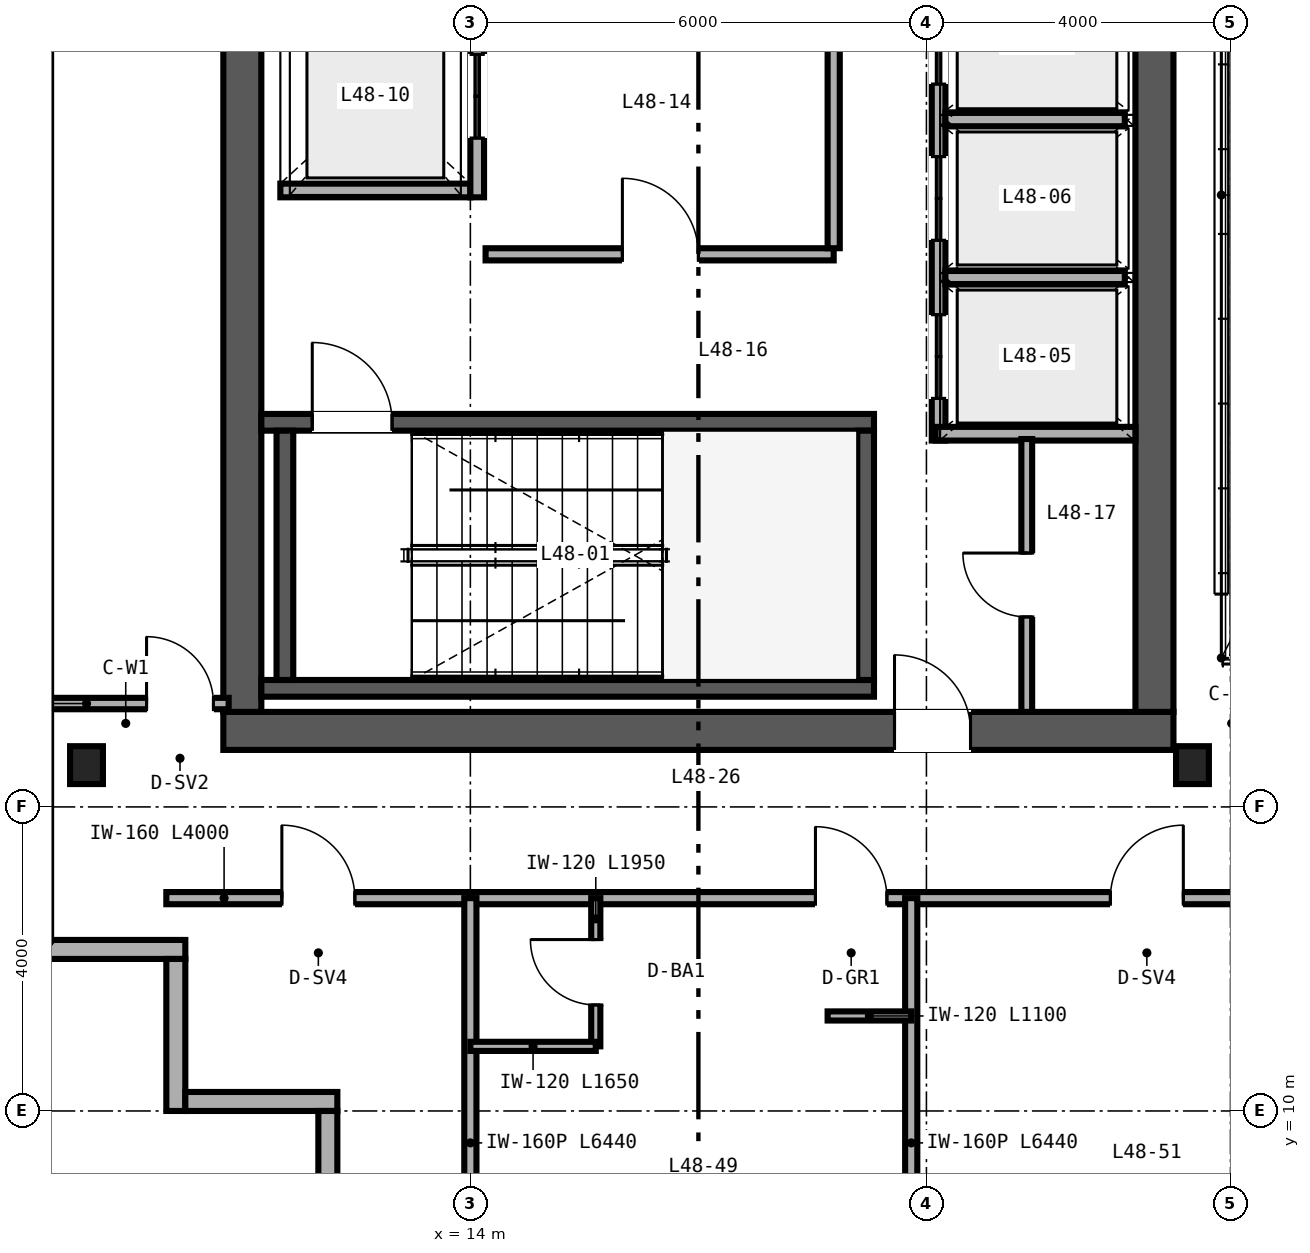
"""IFC4 building model, lengths in metres.
Left out: names, types, materials, properties, quantities, classifications, styles, units other than length and angle.
Written with IfcOpenShell. Run it as: python <this file> out.ifc"""

import sys

from ifc_helpers import new_model, si_unit, direction, frame, frame_2d, origin, origin_2d, place, context, subcontext, project, spatial, rectangle, i_section, extrude, source, transform, mapped, element, fill, save


model = new_model("IFC4")
c1 = context("Model", 3, precision=1e-05, world=origin(), true_north=direction((0.0, 1.0)))
c2 = subcontext(c1, "Body", "Model", "MODEL_VIEW")
j1 = project(units=[si_unit("LENGTHUNIT", "METRE"), si_unit("PLANEANGLEUNIT", "RADIAN")], contexts=[c1])
p1 = place(None, origin())
s1 = spatial("IfcSite", under=j1, at=p1, CompositionType="ELEMENT")
p2 = place(p1, origin())
s2 = spatial("IfcBuilding", under=s1, at=p2, CompositionType="ELEMENT")
p3 = place(p2, frame((0.0, 0.0, 192.0)))
s3 = spatial("IfcBuildingStorey", under=s2, at=p3, CompositionType="ELEMENT", Elevation=192.0)
p4 = place(p3, frame((10.75, 15.0, 0.0), z_axis=(0.0, 0.0, 1.0), x_axis=(1.0, 0.0, 0.0)))
e1 = element("IfcWall", 1, at=p4, inside=s3, PredefinedType="SHEAR", context=c2, shape_type="SweptSolid", body=[
    extrude(rectangle(XDim=12.5, YDim=0.5, at=frame_2d((6.25, 0.0))), origin(), (0.0, 0.0, 1.0), 3.37),
])
p5 = place(p4, frame((8.83, 0.0, 0.0)))
e2 = element("IfcOpeningElement", 2, at=p5, cuts=e1, PredefinedType="OPENING", context=c2, shape_type="SweptSolid", body=[
    extrude(rectangle(XDim=1.0, YDim=2.15, at=frame_2d((0.5, 1.075))), frame((0.0, 0.26, 0.0), z_axis=(0.0, -1.0, 0.0), x_axis=(1.0, 0.0, 0.0)), (0.0, 0.0, 1.0), 0.52),
])
for number, where, z_axis, x_axis in (
    (3, (11.0, 15.25, 0.0), (0.0, 0.0, 1.0), (0.0, 1.0, 0.0)),
    (4, (23.0, 15.25, 0.0), (0.0, 0.0, 1.0), (0.0, 1.0, 0.0)),
):
    element("IfcWall", number, at=place(p3, frame(where, z_axis=z_axis, x_axis=x_axis)), inside=s3, PredefinedType="SHEAR", context=c2, shape_type="SweptSolid", body=[
        extrude(rectangle(XDim=21.5, YDim=0.5, at=frame_2d((10.75, 0.0))), origin(), (0.0, 0.0, 1.0), 3.37),
    ])
p6 = place(p3, frame((11.25, 15.56, 0.0), z_axis=(0.0, 0.0, 1.0), x_axis=(1.0, 0.0, 0.0)))
e5 = element("IfcWall", 5, at=p6, inside=s3, PredefinedType="SHEAR", context=c2, shape_type="SweptSolid", body=[
    extrude(rectangle(XDim=8.06, YDim=0.22, at=frame_2d((4.03, 0.0))), origin(), (0.0, 0.0, 1.0), 3.4),
])
p7 = place(p3, frame((11.25, 19.06, 0.0), z_axis=(0.0, 0.0, 1.0), x_axis=(1.0, 0.0, 0.0)))
e6 = element("IfcWall", 6, at=p7, inside=s3, PredefinedType="SHEAR", context=c2, shape_type="SweptSolid", body=[
    extrude(rectangle(XDim=8.06, YDim=0.22, at=frame_2d((4.03, 0.0))), origin(), (0.0, 0.0, 1.0), 3.4),
])
p8 = place(p7, frame((0.67, 0.0, 0.0)))
e7 = element("IfcOpeningElement", 7, at=p8, cuts=e6, PredefinedType="OPENING", context=c2, shape_type="SweptSolid", body=[
    extrude(rectangle(XDim=1.05, YDim=2.15, at=frame_2d((0.525, 1.075))), frame((0.0, 0.12, 0.0), z_axis=(0.0, -1.0, 0.0), x_axis=(1.0, 0.0, 0.0)), (0.0, 0.0, 1.0), 0.24),
])
for number, where, z_axis, x_axis in (
    (8, (11.56, 15.67, 0.0), (0.0, 0.0, 1.0), (0.0, 1.0, 0.0)),
    (9, (19.2, 15.67, 0.0), (0.0, 0.0, 1.0), (0.0, 1.0, 0.0)),
):
    element("IfcWall", number, at=place(p3, frame(where, z_axis=z_axis, x_axis=x_axis)), inside=s3, PredefinedType="SHEAR", context=c2, shape_type="SweptSolid", body=[
        extrude(rectangle(XDim=3.28, YDim=0.22, at=frame_2d((1.64, 0.0))), origin(), (0.0, 0.0, 1.0), 3.4),
    ])
m1 = source(origin(), c2, "Body", "SweptSolid", [
    extrude(i_section(OverallWidth=0.432, OverallDepth=0.498, WebThickness=0.056, FlangeThickness=0.089, FilletRadius=0.025, at=origin_2d()), origin(), (0.0, 0.0, 1.0), 3.37),
])
for number, where, z_axis, x_axis in (
    (10, (8.95, 14.55, 0.0), (0.0, 0.0, 1.0), (1.0, 0.0, 0.0)),
    (11, (23.5, 14.55, 0.0), (0.0, 0.0, 1.0), (1.0, 0.0, 0.0)),
):
    element("IfcColumn", number, at=place(p3, frame(where, z_axis=z_axis, x_axis=x_axis)), inside=s3, PredefinedType="COLUMN", context=c2, shape_type="MappedRepresentation", body=[
        mapped(m1, transform((0.0, 0.0, 0.0), scale=1.0)),
    ])
p9 = place(p3, frame((8.0, 12.125, 0.0), z_axis=(0.0, 0.0, 1.0), x_axis=(1.0, 0.0, 0.0)))
e12 = element("IfcWall", 12, at=p9, inside=s3, PredefinedType="SOLIDWALL", context=c2, shape_type="SweptSolid", body=[
    extrude(rectangle(XDim=2.25, YDim=0.25, at=frame_2d((1.125, 0.0))), origin(), (0.0, 0.0, 1.0), 3.37),
])
for number, where, z_axis, x_axis in (
    (13, (10.125, 12.0, 0.0), (0.0, 0.0, 1.0), (0.0, -1.0, 0.0)),
    (14, (10.25, 10.125, 0.0), (0.0, 0.0, 1.0), (1.0, 0.0, 0.0)),
    (15, (12.125, 10.0, 0.0), (0.0, 0.0, 1.0), (0.0, -1.0, 0.0)),
):
    element("IfcWall", number, at=place(p3, frame(where, z_axis=z_axis, x_axis=x_axis)), inside=s3, PredefinedType="SOLIDWALL", context=c2, shape_type="SweptSolid", body=[
        extrude(rectangle(XDim=2.0, YDim=0.25, at=frame_2d((1.0, 0.0))), origin(), (0.0, 0.0, 1.0), 3.37),
    ])
p10 = place(p3, frame((20.16, 18.82, 0.0), z_axis=(0.0, 0.0, 1.0), x_axis=(0.0, 1.0, 0.0)))
e16 = element("IfcWall", 16, at=p10, inside=s3, PredefinedType="SOLIDWALL", context=c2, shape_type="SweptSolid", body=[
    extrude(rectangle(XDim=6.32, YDim=0.18, at=frame_2d((3.16, 0.0))), origin(), (0.0, 0.0, 1.0), 2.47),
])
p11 = place(p10, frame((0.555, 0.0, 0.0)))
e17 = element("IfcOpeningElement", 17, at=p11, cuts=e16, PredefinedType="OPENING", context=c2, shape_type="SweptSolid", body=[
    extrude(rectangle(XDim=1.1, YDim=2.2, at=frame_2d((0.55, 1.1))), frame((0.0, 0.1, 0.0), z_axis=(0.0, -1.0, 0.0), x_axis=(1.0, 0.0, 0.0)), (0.0, 0.0, 1.0), 0.2),
])
p12 = place(p10, frame((2.635, 0.0, 0.0)))
e18 = element("IfcOpeningElement", 18, at=p12, cuts=e16, PredefinedType="OPENING", context=c2, shape_type="SweptSolid", body=[
    extrude(rectangle(XDim=1.1, YDim=2.2, at=frame_2d((0.55, 1.1))), frame((0.0, 0.1, 0.0), z_axis=(0.0, -1.0, 0.0), x_axis=(1.0, 0.0, 0.0)), (0.0, 0.0, 1.0), 0.2),
])
p13 = place(p10, frame((4.69, 0.0, 0.0)))
e19 = element("IfcOpeningElement", 19, at=p13, cuts=e16, PredefinedType="OPENING", context=c2, shape_type="SweptSolid", body=[
    extrude(rectangle(XDim=1.1, YDim=2.2, at=frame_2d((0.55, 1.1))), frame((0.0, 0.1, 0.0), z_axis=(0.0, -1.0, 0.0), x_axis=(1.0, 0.0, 0.0)), (0.0, 0.0, 1.0), 0.2),
])
p14 = place(p3, frame((20.12, 18.91, 0.0), z_axis=(0.0, 0.0, 1.0), x_axis=(1.0, 0.0, 0.0)))
e20 = element("IfcWall", 20, at=p14, inside=s3, PredefinedType="SOLIDWALL", context=c2, shape_type="SweptSolid", body=[
    extrude(rectangle(XDim=2.63, YDim=0.18, at=frame_2d((1.315, 0.0))), origin(), (0.0, 0.0, 1.0), 3.37),
])
p15 = place(p3, frame((20.25, 20.965, 0.0), z_axis=(0.0, 0.0, 1.0), x_axis=(1.0, 0.0, 0.0)))
e21 = element("IfcWall", 21, at=p15, inside=s3, PredefinedType="SOLIDWALL", context=c2, shape_type="SweptSolid", body=[
    extrude(rectangle(XDim=2.36, YDim=0.18, at=frame_2d((1.18, 0.0))), origin(), (0.0, 0.0, 1.0), 2.47),
])
p16 = place(p3, frame((20.25, 23.045, 0.0), z_axis=(0.0, 0.0, 1.0), x_axis=(1.0, 0.0, 0.0)))
e22 = element("IfcWall", 22, at=p16, inside=s3, PredefinedType="SOLIDWALL", context=c2, shape_type="SweptSolid", body=[
    extrude(rectangle(XDim=2.36, YDim=0.18, at=frame_2d((1.18, 0.0))), origin(), (0.0, 0.0, 1.0), 3.37),
])
p17 = place(p3, frame((11.5, 22.11, 0.0), z_axis=(0.0, 0.0, 1.0), x_axis=(1.0, 0.0, 0.0)))
e23 = element("IfcWall", 23, at=p17, inside=s3, PredefinedType="SOLIDWALL", context=c2, shape_type="SweptSolid", body=[
    extrude(rectangle(XDim=2.5, YDim=0.18, at=frame_2d((1.25, 0.0))), origin(), (0.0, 0.0, 1.0), 3.37),
])
p18 = place(p3, frame((14.09, 22.02, 0.0), z_axis=(0.0, 0.0, 1.0), x_axis=(0.0, 1.0, 0.0)))
e24 = element("IfcWall", 24, at=p18, inside=s3, PredefinedType="SOLIDWALL", context=c2, shape_type="SweptSolid", body=[
    extrude(rectangle(XDim=2.66, YDim=0.18, at=frame_2d((1.33, 0.0))), origin(), (0.0, 0.0, 1.0), 3.37),
])
p19 = place(p18, frame((0.78, 0.0, 0.0)))
e25 = element("IfcOpeningElement", 25, at=p19, cuts=e24, PredefinedType="OPENING", context=c2, shape_type="SweptSolid", body=[
    extrude(rectangle(XDim=1.1, YDim=2.2, at=frame_2d((0.55, 1.1))), frame((0.0, 0.1, 0.0), z_axis=(0.0, -1.0, 0.0), x_axis=(1.0, 0.0, 0.0)), (0.0, 0.0, 1.0), 0.2),
])
p20 = place(p3, frame((14.2, 21.27, 0.0), z_axis=(0.0, 0.0, 1.0), x_axis=(1.0, 0.0, 0.0)))
e26 = element("IfcWall", 26, at=p20, inside=s3, PredefinedType="PARTITIONING", context=c2, shape_type="SweptSolid", body=[
    extrude(rectangle(XDim=4.58, YDim=0.16, at=frame_2d((2.29, 0.0))), origin(), (0.0, 0.0, 1.0), 3.37),
])
p21 = place(p20, frame((1.8, 0.0, 0.0)))
e27 = element("IfcOpeningElement", 27, at=p21, cuts=e26, PredefinedType="OPENING", context=c2, shape_type="SweptSolid", body=[
    extrude(rectangle(XDim=1.0, YDim=2.15, at=frame_2d((0.5, 1.075))), frame((0.0, 0.09, 0.0), z_axis=(0.0, -1.0, 0.0), x_axis=(1.0, 0.0, 0.0)), (0.0, 0.0, 1.0), 0.18),
])
p22 = place(p3, frame((18.78, 21.35, 0.0), z_axis=(0.0, 0.0, 1.0), x_axis=(0.0, 1.0, 0.0)))
e28 = element("IfcWall", 28, at=p22, inside=s3, PredefinedType="PARTITIONING", context=c2, shape_type="SweptSolid", body=[
    extrude(rectangle(XDim=3.81, YDim=0.16, at=frame_2d((1.905, 0.0))), origin(), (0.0, 0.0, 1.0), 3.37),
])
p23 = place(p3, frame((21.32, 15.25, 0.0), z_axis=(0.0, 0.0, 1.0), x_axis=(0.0, 1.0, 0.0)))
e29 = element("IfcWall", 29, at=p23, inside=s3, PredefinedType="PARTITIONING", context=c2, shape_type="SweptSolid", body=[
    extrude(rectangle(XDim=3.59, YDim=0.142, at=frame_2d((1.795, 0.0))), origin(), (0.0, 0.0, 1.0), 3.37),
])
p24 = place(p23, frame((1.25, 0.0, 0.0)))
e30 = element("IfcOpeningElement", 30, at=p24, cuts=e29, PredefinedType="OPENING", context=c2, shape_type="SweptSolid", body=[
    extrude(rectangle(XDim=0.84, YDim=2.1, at=frame_2d((0.42, 1.05))), frame((0.0, 0.081, 0.0), z_axis=(0.0, -1.0, 0.0), x_axis=(1.0, 0.0, 0.0)), (0.0, 0.0, 1.0), 0.162),
])
p25 = place(p3, frame((8.16, 15.36, 0.0), z_axis=(0.0, 0.0, 1.0), x_axis=(1.0, 0.0, 0.0)))
e31 = element("IfcWall", 31, at=p25, inside=s3, PredefinedType="PARTITIONING", context=c2, shape_type="SweptSolid", body=[
    extrude(rectangle(XDim=2.66, YDim=0.15, at=frame_2d((1.33, 0.0))), origin(), (0.0, 0.0, 1.0), 2.591),
])
p26 = place(p25, frame((1.58, 0.0, 0.0)))
e32 = element("IfcOpeningElement", 32, at=p26, cuts=e31, PredefinedType="OPENING", context=c2, shape_type="SweptSolid", body=[
    extrude(rectangle(XDim=0.88, YDim=2.15, at=frame_2d((0.44, 1.075))), frame((0.0, 0.085, 0.0), z_axis=(0.0, -1.0, 0.0), x_axis=(1.0, 0.0, 0.0)), (0.0, 0.0, 1.0), 0.17),
])
p27 = place(p3, frame((10.0, 12.8, 0.0), z_axis=(0.0, 0.0, 1.0), x_axis=(1.0, 0.0, 0.0)))
e33 = element("IfcWall", 33, at=p27, inside=s3, PredefinedType="PARTITIONING", context=c2, shape_type="SweptSolid", body=[
    extrude(rectangle(XDim=4.0, YDim=0.16, at=frame_2d((2.0, 0.0))), origin(), (0.0, 0.0, 1.0), 3.37),
])
p28 = place(p27, frame((1.52, 0.0, 0.0)))
e34 = element("IfcOpeningElement", 34, at=p28, cuts=e33, PredefinedType="OPENING", context=c2, shape_type="SweptSolid", body=[
    extrude(rectangle(XDim=0.96, YDim=2.15, at=frame_2d((0.48, 1.075))), frame((0.0, 0.09, 0.0), z_axis=(0.0, -1.0, 0.0), x_axis=(1.0, 0.0, 0.0)), (0.0, 0.0, 1.0), 0.18),
])
p29 = place(p3, frame((14.0, 12.8, 0.0), z_axis=(0.0, 0.0, 1.0), x_axis=(1.0, 0.0, 0.0)))
e35 = element("IfcWall", 35, at=p29, inside=s3, PredefinedType="PARTITIONING", context=c2, shape_type="SweptSolid", body=[
    extrude(rectangle(XDim=12.0, YDim=0.16, at=frame_2d((6.0, 0.0))), origin(), (0.0, 0.0, 1.0), 2.913),
])
p30 = place(p29, frame((4.54, 0.0, 0.0)))
e36 = element("IfcOpeningElement", 36, at=p30, cuts=e35, PredefinedType="OPENING", context=c2, shape_type="SweptSolid", body=[
    extrude(rectangle(XDim=0.94, YDim=2.15, at=frame_2d((0.47, 1.075))), frame((0.0, 0.09, 0.0), z_axis=(0.0, -1.0, 0.0), x_axis=(1.0, 0.0, 0.0)), (0.0, 0.0, 1.0), 0.18),
])
p31 = place(p29, frame((8.42, 0.0, 0.0)))
e37 = element("IfcOpeningElement", 37, at=p31, cuts=e35, PredefinedType="OPENING", context=c2, shape_type="SweptSolid", body=[
    extrude(rectangle(XDim=0.96, YDim=2.15, at=frame_2d((0.48, 1.075))), frame((0.0, 0.09, 0.0), z_axis=(0.0, -1.0, 0.0), x_axis=(1.0, 0.0, 0.0)), (0.0, 0.0, 1.0), 0.18),
])
for number, where, z_axis, x_axis in (
    (38, (14.0, 6.36, 0.0), (0.0, 0.0, 1.0), (0.0, 1.0, 0.0)),
    (39, (19.8, 6.36, 0.0), (0.0, 0.0, 1.0), (0.0, 1.0, 0.0)),
):
    element("IfcWall", number, at=place(p3, frame(where, z_axis=z_axis, x_axis=x_axis)), inside=s3, PredefinedType="PARTITIONING", context=c2, shape_type="SweptSolid", body=[
        extrude(rectangle(XDim=6.44, YDim=0.16, at=frame_2d((3.22, 0.0))), origin(), (0.0, 0.0, 1.0), 2.677),
    ])
p32 = place(p3, frame((15.65, 10.85, 0.0), z_axis=(0.0, 0.0, 1.0), x_axis=(0.0, 1.0, 0.0)))
e40 = element("IfcWall", 40, at=p32, inside=s3, PredefinedType="PARTITIONING", context=c2, shape_type="SweptSolid", body=[
    extrude(rectangle(XDim=1.95, YDim=0.12, at=frame_2d((0.975, 0.0))), origin(), (0.0, 0.0, 1.0), 3.37),
])
p33 = place(p32, frame((0.545, 0.0, 0.0)))
e41 = element("IfcOpeningElement", 41, at=p33, cuts=e40, PredefinedType="OPENING", context=c2, shape_type="SweptSolid", body=[
    extrude(rectangle(XDim=0.86, YDim=2.1, at=frame_2d((0.43, 1.05))), frame((0.0, 0.07, 0.0), z_axis=(0.0, -1.0, 0.0), x_axis=(1.0, 0.0, 0.0)), (0.0, 0.0, 1.0), 0.14),
])
p34 = place(p3, frame((14.0, 10.85, 0.0), z_axis=(0.0, 0.0, 1.0), x_axis=(1.0, 0.0, 0.0)))
e42 = element("IfcWall", 42, at=p34, inside=s3, PredefinedType="PARTITIONING", context=c2, shape_type="SweptSolid", body=[
    extrude(rectangle(XDim=1.65, YDim=0.12, at=frame_2d((0.825, 0.0))), origin(), (0.0, 0.0, 1.0), 3.37),
])
p35 = place(p3, frame((18.7, 11.25, 0.0), z_axis=(0.0, 0.0, 1.0), x_axis=(1.0, 0.0, 0.0)))
e43 = element("IfcWall", 43, at=p35, inside=s3, PredefinedType="PARTITIONING", context=c2, shape_type="SweptSolid", body=[
    extrude(rectangle(XDim=1.1, YDim=0.12, at=frame_2d((0.55, 0.0))), origin(), (0.0, 0.0, 1.0), 3.37),
])
m2 = source(origin(), c2, "Body", "SweptSolid", [
    extrude(rectangle(XDim=1.05, YDim=2.15, at=frame_2d((0.525, 1.075))), frame((0.0, 0.025, 0.0), z_axis=(0.0, -1.0, 0.0), x_axis=(1.0, 0.0, 0.0)), (0.0, 0.0, 1.0), 0.05),
])
p36 = place(p8, origin())
e44 = element("IfcDoor", 44, at=p36, inside=s3, OperationType="SINGLE_SWING_LEFT", PredefinedType="DOOR", context=c2, shape_type="MappedRepresentation", body=[
    mapped(m2, transform((0.0, 0.0, 0.0), scale=1.0)),
])
fill(e7, e44)
m3 = source(origin(), c2, "Body", "SweptSolid", [
    extrude(rectangle(XDim=1.1, YDim=2.2, at=frame_2d((0.55, 1.1))), frame((0.0, 0.025, 0.0), z_axis=(0.0, -1.0, 0.0), x_axis=(1.0, 0.0, 0.0)), (0.0, 0.0, 1.0), 0.05),
])
p37 = place(p11, origin())
e45 = element("IfcDoor", 45, at=p37, inside=s3, OperationType="DOUBLE_DOOR_SLIDING", PredefinedType="DOOR", context=c2, shape_type="MappedRepresentation", body=[
    mapped(m3, transform((0.0, 0.0, 0.0), scale=1.0)),
])
fill(e17, e45)
p38 = place(p12, origin())
e46 = element("IfcDoor", 46, at=p38, inside=s3, OperationType="DOUBLE_DOOR_SLIDING", PredefinedType="DOOR", context=c2, shape_type="MappedRepresentation", body=[
    mapped(m3, transform((0.0, 0.0, 0.0), scale=1.0)),
])
fill(e18, e46)
p39 = place(p13, origin())
e47 = element("IfcDoor", 47, at=p39, inside=s3, OperationType="DOUBLE_DOOR_SLIDING", PredefinedType="DOOR", context=c2, shape_type="MappedRepresentation", body=[
    mapped(m3, transform((0.0, 0.0, 0.0), scale=1.0)),
])
fill(e19, e47)
p40 = place(p19, origin())
e48 = element("IfcDoor", 48, at=p40, inside=s3, OperationType="DOUBLE_DOOR_SLIDING", PredefinedType="DOOR", context=c2, shape_type="MappedRepresentation", body=[
    mapped(m3, transform((0.0, 0.0, 0.0), scale=1.0)),
])
fill(e25, e48)
m4 = source(origin(), c2, "Body", "SweptSolid", [
    extrude(rectangle(XDim=1.0, YDim=2.15, at=frame_2d((0.5, 1.075))), frame((0.0, 0.025, 0.0), z_axis=(0.0, -1.0, 0.0), x_axis=(1.0, 0.0, 0.0)), (0.0, 0.0, 1.0), 0.05),
])
p41 = place(p21, origin())
e49 = element("IfcDoor", 49, at=p41, inside=s3, OperationType="SINGLE_SWING_LEFT", PredefinedType="DOOR", context=c2, shape_type="MappedRepresentation", body=[
    mapped(m4, transform((0.0, 0.0, 0.0), scale=1.0)),
])
fill(e27, e49)
m5 = source(origin(), c2, "Body", "SweptSolid", [
    extrude(rectangle(XDim=0.84, YDim=2.1, at=frame_2d((0.42, 1.05))), frame((0.0, 0.025, 0.0), z_axis=(0.0, -1.0, 0.0), x_axis=(1.0, 0.0, 0.0)), (0.0, 0.0, 1.0), 0.05),
])
p42 = place(p24, origin())
e50 = element("IfcDoor", 50, at=p42, inside=s3, OperationType="SINGLE_SWING_RIGHT", PredefinedType="DOOR", context=c2, shape_type="MappedRepresentation", body=[
    mapped(m5, transform((0.0, 0.0, 0.0), scale=1.0)),
])
fill(e30, e50)
p43 = place(p5, origin())
e51 = element("IfcDoor", 51, at=p43, inside=s3, OperationType="SINGLE_SWING_LEFT", PredefinedType="DOOR", context=c2, shape_type="MappedRepresentation", body=[
    mapped(m4, transform((0.0, 0.0, 0.0), scale=1.0)),
])
fill(e2, e51)
m6 = source(origin(), c2, "Body", "SweptSolid", [
    extrude(rectangle(XDim=0.88, YDim=2.15, at=frame_2d((0.44, 1.075))), frame((0.0, 0.025, 0.0), z_axis=(0.0, -1.0, 0.0), x_axis=(1.0, 0.0, 0.0)), (0.0, 0.0, 1.0), 0.05),
])
p44 = place(p26, origin())
e52 = element("IfcDoor", 52, at=p44, inside=s3, OperationType="SINGLE_SWING_LEFT", PredefinedType="DOOR", context=c2, shape_type="MappedRepresentation", body=[
    mapped(m6, transform((0.0, 0.0, 0.0), scale=1.0)),
])
fill(e32, e52)
m7 = source(origin(), c2, "Body", "SweptSolid", [
    extrude(rectangle(XDim=0.96, YDim=2.15, at=frame_2d((0.48, 1.075))), frame((0.0, 0.025, 0.0), z_axis=(0.0, -1.0, 0.0), x_axis=(1.0, 0.0, 0.0)), (0.0, 0.0, 1.0), 0.05),
])
p45 = place(p28, origin())
e53 = element("IfcDoor", 53, at=p45, inside=s3, OperationType="SINGLE_SWING_LEFT", PredefinedType="DOOR", context=c2, shape_type="MappedRepresentation", body=[
    mapped(m7, transform((0.0, 0.0, 0.0), scale=1.0)),
])
fill(e34, e53)
m8 = source(origin(), c2, "Body", "SweptSolid", [
    extrude(rectangle(XDim=0.86, YDim=2.1, at=frame_2d((0.43, 1.05))), frame((0.0, 0.025, 0.0), z_axis=(0.0, -1.0, 0.0), x_axis=(1.0, 0.0, 0.0)), (0.0, 0.0, 1.0), 0.05),
])
p46 = place(p33, origin())
e54 = element("IfcDoor", 54, at=p46, inside=s3, OperationType="SINGLE_SWING_RIGHT", PredefinedType="DOOR", context=c2, shape_type="MappedRepresentation", body=[
    mapped(m8, transform((0.0, 0.0, 0.0), scale=1.0)),
])
fill(e41, e54)
m9 = source(origin(), c2, "Body", "SweptSolid", [
    extrude(rectangle(XDim=0.94, YDim=2.15, at=frame_2d((0.47, 1.075))), frame((0.0, 0.025, 0.0), z_axis=(0.0, -1.0, 0.0), x_axis=(1.0, 0.0, 0.0)), (0.0, 0.0, 1.0), 0.05),
])
p47 = place(p30, origin())
e55 = element("IfcDoor", 55, at=p47, inside=s3, OperationType="SINGLE_SWING_LEFT", PredefinedType="DOOR", context=c2, shape_type="MappedRepresentation", body=[
    mapped(m9, transform((0.0, 0.0, 0.0), scale=1.0)),
])
fill(e36, e55)
p48 = place(p31, origin())
e56 = element("IfcDoor", 56, at=p48, inside=s3, OperationType="SINGLE_SWING_RIGHT", PredefinedType="DOOR", context=c2, shape_type="MappedRepresentation", body=[
    mapped(m7, transform((0.0, 0.0, 0.0), scale=1.0)),
])
fill(e37, e56)
save(model, sys.argv[1])
